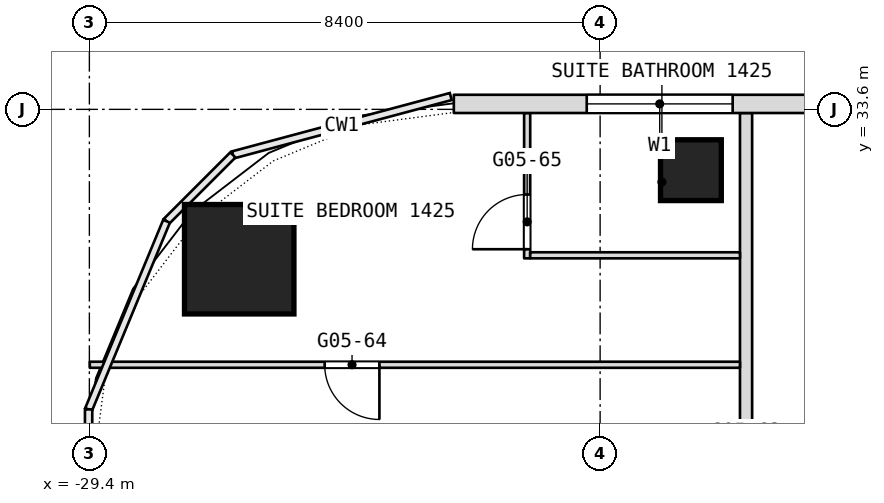
"""IFC4 building model, lengths in metres.
Left out: names, types, materials, properties, quantities, classifications, styles, units other than length and angle.
Written with IfcOpenShell. Run it as: python <this file> out.ifc"""

import sys

from ifc_helpers import new_model, si_unit, direction, frame, frame_2d, origin, origin_2d, place, context, subcontext, project, spatial, rectangle, extrude, element, fill, save


model = new_model("IFC4")
c1 = context("Model", 3, precision=1e-05, world=origin(), true_north=direction((0.0, 1.0)))
c2 = subcontext(c1, "Body", "Model", "MODEL_VIEW")
j1 = project(units=[si_unit("LENGTHUNIT", "METRE"), si_unit("PLANEANGLEUNIT", "RADIAN")], contexts=[c1])
p1 = place(None, origin())
s1 = spatial("IfcSite", under=j1, at=p1, CompositionType="ELEMENT")
p2 = place(p1, origin())
s2 = spatial("IfcBuilding", under=s1, at=p2, CompositionType="ELEMENT")
p3 = place(p2, frame((0.0, 0.0, 65.3)))
s3 = spatial("IfcBuildingStorey", under=s2, at=p3, CompositionType="ELEMENT", Elevation=65.3)
p4 = place(p3, frame((-26.936, 31.135, 0.0), z_axis=(0.0, 0.0, 1.0), x_axis=(1.0, 0.0, 0.0)))
e1 = element("IfcColumn", 1, at=p4, inside=s3, PredefinedType="COLUMN", context=c2, shape_type="SweptSolid", body=[
    extrude(rectangle(XDim=1.8, YDim=1.8, at=origin_2d()), origin(), (0.0, 0.0, 1.0), 3.6),
])
p5 = place(p3, frame((-19.507, 32.6, 0.0), z_axis=(0.0, 0.0, 1.0), x_axis=(1.0, 0.0, 0.0)))
e2 = element("IfcColumn", 2, at=p5, inside=s3, PredefinedType="COLUMN", context=c2, shape_type="SweptSolid", body=[
    extrude(rectangle(XDim=1.0, YDim=1.0, at=origin_2d()), origin(), (0.0, 0.0, 1.0), 3.6),
])
p6 = place(p3, frame((-18.6, 18.5, 0.0), z_axis=(0.0, 0.0, 1.0), x_axis=(0.0, 1.0, 0.0)))
e3 = element("IfcWall", 3, at=p6, inside=s3, PredefinedType="PARTITIONING", context=c2, shape_type="SweptSolid", body=[
    extrude(rectangle(XDim=15.04, YDim=0.2, at=frame_2d((7.52, 0.0))), origin(), (0.0, 0.0, 1.0), 3.34),
])
p7 = place(p6, frame((2.0, 0.0, 0.0)))
e4 = element("IfcOpeningElement", 4, at=p7, cuts=e3, PredefinedType="OPENING", context=c2, shape_type="SweptSolid", body=[
    extrude(rectangle(XDim=1.1, YDim=2.1, at=frame_2d((0.55, 1.05))), frame((0.0, 0.1, 0.0), z_axis=(0.0, -1.0, 0.0), x_axis=(1.0, 0.0, 0.0)), (0.0, 0.0, 1.0), 0.2),
])
p8 = place(p6, frame((8.25, 0.0, 0.0)))
e5 = element("IfcOpeningElement", 5, at=p8, cuts=e3, PredefinedType="OPENING", context=c2, shape_type="SweptSolid", body=[
    extrude(rectangle(XDim=1.1, YDim=2.1, at=frame_2d((0.55, 1.05))), frame((0.0, 0.1, 0.0), z_axis=(0.0, -1.0, 0.0), x_axis=(1.0, 0.0, 0.0)), (0.0, 0.0, 1.0), 0.2),
])
p9 = place(p3, frame((-22.2, 31.15, 0.0), z_axis=(0.0, 0.0, 1.0), x_axis=(0.0, 1.0, 0.0)))
e6 = element("IfcWall", 6, at=p9, inside=s3, PredefinedType="PARTITIONING", context=c2, shape_type="SweptSolid", body=[
    extrude(rectangle(XDim=2.39, YDim=0.1, at=frame_2d((1.195, 0.0))), origin(), (0.0, 0.0, 1.0), 3.34),
])
p10 = place(p9, frame((0.15, 0.0, 0.0)))
e7 = element("IfcOpeningElement", 7, at=p10, cuts=e6, PredefinedType="OPENING", context=c2, shape_type="SweptSolid", body=[
    extrude(rectangle(XDim=0.9, YDim=2.1, at=frame_2d((0.45, 1.05))), frame((0.0, 0.05, 0.0), z_axis=(0.0, -1.0, 0.0), x_axis=(1.0, 0.0, 0.0)), (0.0, 0.0, 1.0), 0.1),
])
p11 = place(p3, frame((-29.393, 29.4, 0.0), z_axis=(0.0, 0.0, 1.0), x_axis=(1.0, 0.0, 0.0)))
e8 = element("IfcWall", 8, at=p11, inside=s3, PredefinedType="PARTITIONING", context=c2, shape_type="SweptSolid", body=[
    extrude(rectangle(XDim=10.693, YDim=0.1, at=frame_2d((5.347, 0.0))), origin(), (0.0, 0.0, 1.0), 3.34),
])
p12 = place(p11, frame((3.863, 0.0, 0.0)))
e9 = element("IfcOpeningElement", 9, at=p12, cuts=e8, PredefinedType="OPENING", context=c2, shape_type="SweptSolid", body=[
    extrude(rectangle(XDim=0.9, YDim=2.1, at=frame_2d((0.45, 1.05))), frame((0.0, 0.05, 0.0), z_axis=(0.0, -1.0, 0.0), x_axis=(1.0, 0.0, 0.0)), (0.0, 0.0, 1.0), 0.1),
])
p13 = place(p3, frame((-22.15, 31.2, 0.0), z_axis=(0.0, 0.0, 1.0), x_axis=(1.0, 0.0, 0.0)))
e10 = element("IfcWall", 10, at=p13, inside=s3, PredefinedType="PARTITIONING", context=c2, shape_type="SweptSolid", body=[
    extrude(rectangle(XDim=3.45, YDim=0.1, at=frame_2d((1.725, 0.0))), origin(), (0.0, 0.0, 1.0), 3.34),
])
p14 = place(p3, frame((23.406, 33.69, 0.0), z_axis=(0.0, 0.0, 1.0), x_axis=(-1.0, 0.0, 0.0)))
e11 = element("IfcWall", 11, at=p14, inside=s3, PredefinedType="NOTDEFINED", context=c2, shape_type="SweptSolid", body=[
    extrude(rectangle(XDim=46.812, YDim=0.3, at=frame_2d((23.406, 0.0))), origin(), (0.0, 0.0, 1.0), 3.6),
])
p15 = place(p14, frame((2.186, 0.0, 0.9)))
e12 = element("IfcOpeningElement", 12, at=p15, cuts=e11, PredefinedType="OPENING", context=c2, shape_type="SweptSolid", body=[
    extrude(rectangle(XDim=2.4, YDim=2.1, at=frame_2d((1.2, 1.05))), frame((0.0, 0.15, 0.0), z_axis=(0.0, -1.0, 0.0), x_axis=(1.0, 0.0, 0.0)), (0.0, 0.0, 1.0), 0.3),
])
p16 = place(p14, frame((7.506, 0.0, 0.9)))
e13 = element("IfcOpeningElement", 13, at=p16, cuts=e11, PredefinedType="OPENING", context=c2, shape_type="SweptSolid", body=[
    extrude(rectangle(XDim=2.4, YDim=2.1, at=frame_2d((1.2, 1.05))), frame((0.0, 0.15, 0.0), z_axis=(0.0, -1.0, 0.0), x_axis=(1.0, 0.0, 0.0)), (0.0, 0.0, 1.0), 0.3),
])
p17 = place(p14, frame((11.706, 0.0, 0.9)))
e14 = element("IfcOpeningElement", 14, at=p17, cuts=e11, PredefinedType="OPENING", context=c2, shape_type="SweptSolid", body=[
    extrude(rectangle(XDim=2.4, YDim=2.1, at=frame_2d((1.2, 1.05))), frame((0.0, 0.15, 0.0), z_axis=(0.0, -1.0, 0.0), x_axis=(1.0, 0.0, 0.0)), (0.0, 0.0, 1.0), 0.3),
])
p18 = place(p14, frame((15.906, 0.0, 0.9)))
e15 = element("IfcOpeningElement", 15, at=p18, cuts=e11, PredefinedType="OPENING", context=c2, shape_type="SweptSolid", body=[
    extrude(rectangle(XDim=2.4, YDim=2.1, at=frame_2d((1.2, 1.05))), frame((0.0, 0.15, 0.0), z_axis=(0.0, -1.0, 0.0), x_axis=(1.0, 0.0, 0.0)), (0.0, 0.0, 1.0), 0.3),
])
p19 = place(p14, frame((20.106, 0.0, 0.9)))
e16 = element("IfcOpeningElement", 16, at=p19, cuts=e11, PredefinedType="OPENING", context=c2, shape_type="SweptSolid", body=[
    extrude(rectangle(XDim=2.4, YDim=2.1, at=frame_2d((1.2, 1.05))), frame((0.0, 0.15, 0.0), z_axis=(0.0, -1.0, 0.0), x_axis=(1.0, 0.0, 0.0)), (0.0, 0.0, 1.0), 0.3),
])
p20 = place(p14, frame((24.306, 0.0, 0.9)))
e17 = element("IfcOpeningElement", 17, at=p20, cuts=e11, PredefinedType="OPENING", context=c2, shape_type="SweptSolid", body=[
    extrude(rectangle(XDim=2.4, YDim=2.1, at=frame_2d((1.2, 1.05))), frame((0.0, 0.15, 0.0), z_axis=(0.0, -1.0, 0.0), x_axis=(1.0, 0.0, 0.0)), (0.0, 0.0, 1.0), 0.3),
])
p21 = place(p14, frame((28.506, 0.0, 0.9)))
e18 = element("IfcOpeningElement", 18, at=p21, cuts=e11, PredefinedType="OPENING", context=c2, shape_type="SweptSolid", body=[
    extrude(rectangle(XDim=2.4, YDim=2.1, at=frame_2d((1.2, 1.05))), frame((0.0, 0.15, 0.0), z_axis=(0.0, -1.0, 0.0), x_axis=(1.0, 0.0, 0.0)), (0.0, 0.0, 1.0), 0.3),
])
p22 = place(p14, frame((32.706, 0.0, 0.9)))
e19 = element("IfcOpeningElement", 19, at=p22, cuts=e11, PredefinedType="OPENING", context=c2, shape_type="SweptSolid", body=[
    extrude(rectangle(XDim=2.4, YDim=2.1, at=frame_2d((1.2, 1.05))), frame((0.0, 0.15, 0.0), z_axis=(0.0, -1.0, 0.0), x_axis=(1.0, 0.0, 0.0)), (0.0, 0.0, 1.0), 0.3),
])
p23 = place(p14, frame((36.906, 0.0, 0.9)))
e20 = element("IfcOpeningElement", 20, at=p23, cuts=e11, PredefinedType="OPENING", context=c2, shape_type="SweptSolid", body=[
    extrude(rectangle(XDim=2.4, YDim=2.1, at=frame_2d((1.2, 1.05))), frame((0.0, 0.15, 0.0), z_axis=(0.0, -1.0, 0.0), x_axis=(1.0, 0.0, 0.0)), (0.0, 0.0, 1.0), 0.3),
])
p24 = place(p14, frame((42.226, 0.0, 0.9)))
e21 = element("IfcOpeningElement", 21, at=p24, cuts=e11, PredefinedType="OPENING", context=c2, shape_type="SweptSolid", body=[
    extrude(rectangle(XDim=2.4, YDim=2.1, at=frame_2d((1.2, 1.05))), frame((0.0, 0.15, 0.0), z_axis=(0.0, -1.0, 0.0), x_axis=(1.0, 0.0, 0.0)), (0.0, 0.0, 1.0), 0.3),
])
p25 = place(p10, origin())
e22 = element("IfcDoor", 22, at=p25, inside=s3, OperationType="SINGLE_SWING_RIGHT", PredefinedType="DOOR", context=c2, shape_type="SweptSolid", body=[
    extrude(rectangle(XDim=0.9, YDim=2.1, at=frame_2d((0.45, 1.05))), frame((0.0, 0.025, 0.0), z_axis=(0.0, -1.0, 0.0), x_axis=(1.0, 0.0, 0.0)), (0.0, 0.0, 1.0), 0.05),
])
fill(e7, e22)
p26 = place(p12, origin())
e23 = element("IfcDoor", 23, at=p26, inside=s3, OperationType="SINGLE_SWING_LEFT", PredefinedType="DOOR", context=c2, shape_type="SweptSolid", body=[
    extrude(rectangle(XDim=0.9, YDim=2.1, at=frame_2d((0.45, 1.05))), frame((0.0, 0.025, 0.0), z_axis=(0.0, -1.0, 0.0), x_axis=(1.0, 0.0, 0.0)), (0.0, 0.0, 1.0), 0.05),
])
fill(e9, e23)
p27 = place(p24, origin())
e24 = element("IfcWindow", 24, at=p27, inside=s3, PartitioningType="SINGLE_PANEL", PredefinedType="WINDOW", context=c2, shape_type="SweptSolid", body=[
    extrude(rectangle(XDim=2.4, YDim=2.1, at=frame_2d((1.2, 1.05))), frame((0.0, 0.03, 0.0), z_axis=(0.0, -1.0, 0.0), x_axis=(1.0, 0.0, 0.0)), (0.0, 0.0, 1.0), 0.06),
])
fill(e21, e24)
save(model, sys.argv[1])
